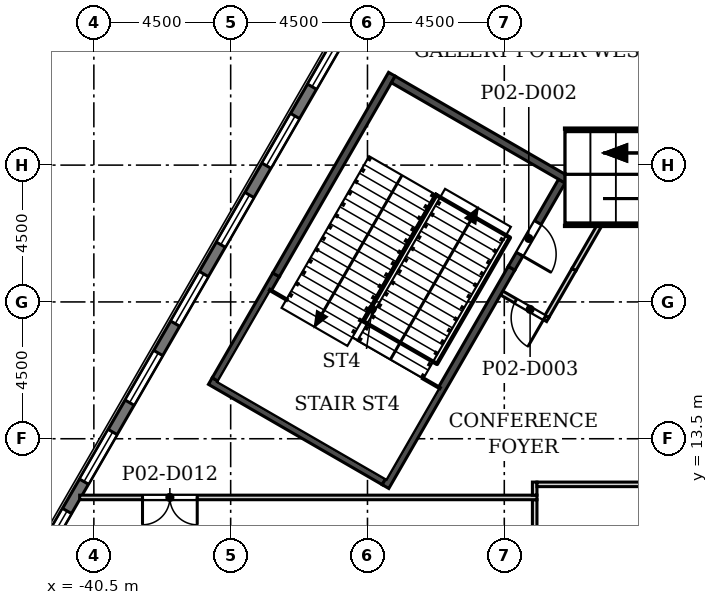
"""IFC4 building model, lengths in metres.
Left out: names, types, materials, properties, quantities, classifications, styles, units other than length and angle.
Written with IfcOpenShell. Run it as: python <this file> out.ifc"""

import sys

from ifc_helpers import new_model, si_unit, direction, frame, frame_2d, origin, place, context, subcontext, project, spatial, rectangle, extrude, element, fill, save


model = new_model("IFC4")
c1 = context("Model", 3, precision=1e-05, world=origin(), true_north=direction((0.0, 1.0)))
c2 = subcontext(c1, "Body", "Model", "MODEL_VIEW")
j1 = project(units=[si_unit("LENGTHUNIT", "METRE"), si_unit("PLANEANGLEUNIT", "RADIAN")], contexts=[c1])
p1 = place(None, origin())
s1 = spatial("IfcSite", under=j1, at=p1, CompositionType="ELEMENT")
p2 = place(p1, origin())
s2 = spatial("IfcBuilding", under=s1, at=p2, CompositionType="ELEMENT")
p3 = place(p2, frame((0.0, 0.0, 14.0)))
s3 = spatial("IfcBuildingStorey", under=s2, at=p3, CompositionType="ELEMENT", Elevation=14.0)
p4 = place(p3, frame((-4.853, 74.393, 0.0), z_axis=(0.0, 0.0, 1.0), x_axis=(-0.49999894854, -0.866026010844, 0.0)))
e1 = element("IfcWall", 1, at=p4, inside=s3, PredefinedType="SOLIDWALL", context=c2, shape_type="SweptSolid", body=[
    extrude(rectangle(XDim=76.0, YDim=0.34, at=frame_2d((38.0, 0.0))), origin(), (0.0, 0.0, 1.0), 5.7),
])
p5 = place(p4, frame((1.058, 0.0, 0.9)))
e2 = element("IfcOpeningElement", 2, at=p5, cuts=e1, PredefinedType="OPENING", context=c2, shape_type="SweptSolid", body=[
    extrude(rectangle(XDim=1.885, YDim=3.5, at=frame_2d((0.942, 1.75))), frame((0.0, 0.18, 0.0), z_axis=(0.0, -1.0, 0.0), x_axis=(1.0, 0.0, 0.0)), (0.0, 0.0, 1.0), 0.36),
])
p6 = place(p4, frame((4.058, 0.0, 0.9)))
e3 = element("IfcOpeningElement", 3, at=p6, cuts=e1, PredefinedType="OPENING", context=c2, shape_type="SweptSolid", body=[
    extrude(rectangle(XDim=1.885, YDim=3.5, at=frame_2d((0.942, 1.75))), frame((0.0, 0.18, 0.0), z_axis=(0.0, -1.0, 0.0), x_axis=(1.0, 0.0, 0.0)), (0.0, 0.0, 1.0), 0.36),
])
p7 = place(p4, frame((7.058, 0.0, 0.9)))
e4 = element("IfcOpeningElement", 4, at=p7, cuts=e1, PredefinedType="OPENING", context=c2, shape_type="SweptSolid", body=[
    extrude(rectangle(XDim=1.885, YDim=3.5, at=frame_2d((0.942, 1.75))), frame((0.0, 0.18, 0.0), z_axis=(0.0, -1.0, 0.0), x_axis=(1.0, 0.0, 0.0)), (0.0, 0.0, 1.0), 0.36),
])
p8 = place(p4, frame((10.058, 0.0, 0.9)))
e5 = element("IfcOpeningElement", 5, at=p8, cuts=e1, PredefinedType="OPENING", context=c2, shape_type="SweptSolid", body=[
    extrude(rectangle(XDim=1.885, YDim=3.5, at=frame_2d((0.942, 1.75))), frame((0.0, 0.18, 0.0), z_axis=(0.0, -1.0, 0.0), x_axis=(1.0, 0.0, 0.0)), (0.0, 0.0, 1.0), 0.36),
])
p9 = place(p4, frame((13.058, 0.0, 0.9)))
e6 = element("IfcOpeningElement", 6, at=p9, cuts=e1, PredefinedType="OPENING", context=c2, shape_type="SweptSolid", body=[
    extrude(rectangle(XDim=1.885, YDim=3.5, at=frame_2d((0.942, 1.75))), frame((0.0, 0.18, 0.0), z_axis=(0.0, -1.0, 0.0), x_axis=(1.0, 0.0, 0.0)), (0.0, 0.0, 1.0), 0.36),
])
p10 = place(p4, frame((16.058, 0.0, 0.9)))
e7 = element("IfcOpeningElement", 7, at=p10, cuts=e1, PredefinedType="OPENING", context=c2, shape_type="SweptSolid", body=[
    extrude(rectangle(XDim=1.885, YDim=3.5, at=frame_2d((0.942, 1.75))), frame((0.0, 0.18, 0.0), z_axis=(0.0, -1.0, 0.0), x_axis=(1.0, 0.0, 0.0)), (0.0, 0.0, 1.0), 0.36),
])
p11 = place(p4, frame((19.058, 0.0, 0.9)))
e8 = element("IfcOpeningElement", 8, at=p11, cuts=e1, PredefinedType="OPENING", context=c2, shape_type="SweptSolid", body=[
    extrude(rectangle(XDim=1.885, YDim=3.5, at=frame_2d((0.942, 1.75))), frame((0.0, 0.18, 0.0), z_axis=(0.0, -1.0, 0.0), x_axis=(1.0, 0.0, 0.0)), (0.0, 0.0, 1.0), 0.36),
])
p12 = place(p4, frame((22.058, 0.0, 0.9)))
e9 = element("IfcOpeningElement", 9, at=p12, cuts=e1, PredefinedType="OPENING", context=c2, shape_type="SweptSolid", body=[
    extrude(rectangle(XDim=1.885, YDim=3.5, at=frame_2d((0.942, 1.75))), frame((0.0, 0.18, 0.0), z_axis=(0.0, -1.0, 0.0), x_axis=(1.0, 0.0, 0.0)), (0.0, 0.0, 1.0), 0.36),
])
p13 = place(p4, frame((25.058, 0.0, 0.9)))
e10 = element("IfcOpeningElement", 10, at=p13, cuts=e1, PredefinedType="OPENING", context=c2, shape_type="SweptSolid", body=[
    extrude(rectangle(XDim=1.885, YDim=3.5, at=frame_2d((0.942, 1.75))), frame((0.0, 0.18, 0.0), z_axis=(0.0, -1.0, 0.0), x_axis=(1.0, 0.0, 0.0)), (0.0, 0.0, 1.0), 0.36),
])
p14 = place(p4, frame((28.058, 0.0, 0.9)))
e11 = element("IfcOpeningElement", 11, at=p14, cuts=e1, PredefinedType="OPENING", context=c2, shape_type="SweptSolid", body=[
    extrude(rectangle(XDim=1.885, YDim=3.5, at=frame_2d((0.942, 1.75))), frame((0.0, 0.18, 0.0), z_axis=(0.0, -1.0, 0.0), x_axis=(1.0, 0.0, 0.0)), (0.0, 0.0, 1.0), 0.36),
])
p15 = place(p4, frame((31.058, 0.0, 0.9)))
e12 = element("IfcOpeningElement", 12, at=p15, cuts=e1, PredefinedType="OPENING", context=c2, shape_type="SweptSolid", body=[
    extrude(rectangle(XDim=1.885, YDim=3.5, at=frame_2d((0.942, 1.75))), frame((0.0, 0.18, 0.0), z_axis=(0.0, -1.0, 0.0), x_axis=(1.0, 0.0, 0.0)), (0.0, 0.0, 1.0), 0.36),
])
p16 = place(p4, frame((34.058, 0.0, 0.9)))
e13 = element("IfcOpeningElement", 13, at=p16, cuts=e1, PredefinedType="OPENING", context=c2, shape_type="SweptSolid", body=[
    extrude(rectangle(XDim=1.885, YDim=3.5, at=frame_2d((0.942, 1.75))), frame((0.0, 0.18, 0.0), z_axis=(0.0, -1.0, 0.0), x_axis=(1.0, 0.0, 0.0)), (0.0, 0.0, 1.0), 0.36),
])
p17 = place(p4, frame((37.058, 0.0, 0.9)))
e14 = element("IfcOpeningElement", 14, at=p17, cuts=e1, PredefinedType="OPENING", context=c2, shape_type="SweptSolid", body=[
    extrude(rectangle(XDim=1.885, YDim=3.5, at=frame_2d((0.942, 1.75))), frame((0.0, 0.18, 0.0), z_axis=(0.0, -1.0, 0.0), x_axis=(1.0, 0.0, 0.0)), (0.0, 0.0, 1.0), 0.36),
])
p18 = place(p4, frame((40.058, 0.0, 0.9)))
e15 = element("IfcOpeningElement", 15, at=p18, cuts=e1, PredefinedType="OPENING", context=c2, shape_type="SweptSolid", body=[
    extrude(rectangle(XDim=1.885, YDim=3.5, at=frame_2d((0.942, 1.75))), frame((0.0, 0.18, 0.0), z_axis=(0.0, -1.0, 0.0), x_axis=(1.0, 0.0, 0.0)), (0.0, 0.0, 1.0), 0.36),
])
p19 = place(p4, frame((43.058, 0.0, 0.9)))
e16 = element("IfcOpeningElement", 16, at=p19, cuts=e1, PredefinedType="OPENING", context=c2, shape_type="SweptSolid", body=[
    extrude(rectangle(XDim=1.885, YDim=3.5, at=frame_2d((0.942, 1.75))), frame((0.0, 0.18, 0.0), z_axis=(0.0, -1.0, 0.0), x_axis=(1.0, 0.0, 0.0)), (0.0, 0.0, 1.0), 0.36),
])
p20 = place(p4, frame((46.058, 0.0, 0.9)))
e17 = element("IfcOpeningElement", 17, at=p20, cuts=e1, PredefinedType="OPENING", context=c2, shape_type="SweptSolid", body=[
    extrude(rectangle(XDim=1.885, YDim=3.5, at=frame_2d((0.942, 1.75))), frame((0.0, 0.18, 0.0), z_axis=(0.0, -1.0, 0.0), x_axis=(1.0, 0.0, 0.0)), (0.0, 0.0, 1.0), 0.36),
])
p21 = place(p4, frame((49.058, 0.0, 0.9)))
e18 = element("IfcOpeningElement", 18, at=p21, cuts=e1, PredefinedType="OPENING", context=c2, shape_type="SweptSolid", body=[
    extrude(rectangle(XDim=1.885, YDim=3.5, at=frame_2d((0.942, 1.75))), frame((0.0, 0.18, 0.0), z_axis=(0.0, -1.0, 0.0), x_axis=(1.0, 0.0, 0.0)), (0.0, 0.0, 1.0), 0.36),
])
p22 = place(p4, frame((52.058, 0.0, 0.9)))
e19 = element("IfcOpeningElement", 19, at=p22, cuts=e1, PredefinedType="OPENING", context=c2, shape_type="SweptSolid", body=[
    extrude(rectangle(XDim=1.885, YDim=3.5, at=frame_2d((0.942, 1.75))), frame((0.0, 0.18, 0.0), z_axis=(0.0, -1.0, 0.0), x_axis=(1.0, 0.0, 0.0)), (0.0, 0.0, 1.0), 0.36),
])
p23 = place(p4, frame((55.058, 0.0, 0.9)))
e20 = element("IfcOpeningElement", 20, at=p23, cuts=e1, PredefinedType="OPENING", context=c2, shape_type="SweptSolid", body=[
    extrude(rectangle(XDim=1.885, YDim=3.5, at=frame_2d((0.942, 1.75))), frame((0.0, 0.18, 0.0), z_axis=(0.0, -1.0, 0.0), x_axis=(1.0, 0.0, 0.0)), (0.0, 0.0, 1.0), 0.36),
])
p24 = place(p4, frame((58.058, 0.0, 0.9)))
e21 = element("IfcOpeningElement", 21, at=p24, cuts=e1, PredefinedType="OPENING", context=c2, shape_type="SweptSolid", body=[
    extrude(rectangle(XDim=1.885, YDim=3.5, at=frame_2d((0.942, 1.75))), frame((0.0, 0.18, 0.0), z_axis=(0.0, -1.0, 0.0), x_axis=(1.0, 0.0, 0.0)), (0.0, 0.0, 1.0), 0.36),
])
p25 = place(p4, frame((61.058, 0.0, 0.9)))
e22 = element("IfcOpeningElement", 22, at=p25, cuts=e1, PredefinedType="OPENING", context=c2, shape_type="SweptSolid", body=[
    extrude(rectangle(XDim=1.885, YDim=3.5, at=frame_2d((0.942, 1.75))), frame((0.0, 0.18, 0.0), z_axis=(0.0, -1.0, 0.0), x_axis=(1.0, 0.0, 0.0)), (0.0, 0.0, 1.0), 0.36),
])
p26 = place(p4, frame((64.058, 0.0, 0.9)))
e23 = element("IfcOpeningElement", 23, at=p26, cuts=e1, PredefinedType="OPENING", context=c2, shape_type="SweptSolid", body=[
    extrude(rectangle(XDim=1.885, YDim=3.5, at=frame_2d((0.942, 1.75))), frame((0.0, 0.18, 0.0), z_axis=(0.0, -1.0, 0.0), x_axis=(1.0, 0.0, 0.0)), (0.0, 0.0, 1.0), 0.36),
])
p27 = place(p4, frame((67.058, 0.0, 0.9)))
e24 = element("IfcOpeningElement", 24, at=p27, cuts=e1, PredefinedType="OPENING", context=c2, shape_type="SweptSolid", body=[
    extrude(rectangle(XDim=1.885, YDim=3.5, at=frame_2d((0.942, 1.75))), frame((0.0, 0.18, 0.0), z_axis=(0.0, -1.0, 0.0), x_axis=(1.0, 0.0, 0.0)), (0.0, 0.0, 1.0), 0.36),
])
p28 = place(p4, frame((70.058, 0.0, 0.9)))
e25 = element("IfcOpeningElement", 25, at=p28, cuts=e1, PredefinedType="OPENING", context=c2, shape_type="SweptSolid", body=[
    extrude(rectangle(XDim=1.885, YDim=3.5, at=frame_2d((0.942, 1.75))), frame((0.0, 0.18, 0.0), z_axis=(0.0, -1.0, 0.0), x_axis=(1.0, 0.0, 0.0)), (0.0, 0.0, 1.0), 0.36),
])
p29 = place(p4, frame((73.058, 0.0, 0.9)))
e26 = element("IfcOpeningElement", 26, at=p29, cuts=e1, PredefinedType="OPENING", context=c2, shape_type="SweptSolid", body=[
    extrude(rectangle(XDim=1.885, YDim=3.5, at=frame_2d((0.942, 1.75))), frame((0.0, 0.18, 0.0), z_axis=(0.0, -1.0, 0.0), x_axis=(1.0, 0.0, 0.0)), (0.0, 0.0, 1.0), 0.36),
])
p30 = place(p3, frame((-26.0, 11.495, 0.0), z_axis=(0.0, 0.0, 1.0), x_axis=(0.0, -1.0, 0.0)))
e27 = element("IfcWall", 27, at=p30, inside=s3, PredefinedType="PARTITIONING", context=c2, shape_type="SweptSolid", body=[
    extrude(rectangle(XDim=1.42, YDim=0.15, at=frame_2d((0.71, 0.0))), origin(), (0.0, 0.0, 1.0), 5.7),
])
p31 = place(p3, frame((-40.968, 11.57, 0.0), z_axis=(0.0, 0.0, 1.0), x_axis=(1.0, 0.0, 0.0)))
e28 = element("IfcWall", 28, at=p31, inside=s3, PredefinedType="PARTITIONING", context=c2, shape_type="SweptSolid", body=[
    extrude(rectangle(XDim=15.043, YDim=0.15, at=frame_2d((7.521, 0.0))), origin(), (0.0, 0.0, 1.0), 5.7),
])
p32 = place(p31, frame((2.068, 0.0, 0.0)))
e29 = element("IfcOpeningElement", 29, at=p32, cuts=e28, PredefinedType="OPENING", context=c2, shape_type="SweptSolid", body=[
    extrude(rectangle(XDim=1.8, YDim=2.1, at=frame_2d((0.9, 1.05))), frame((0.0, 0.085, 0.0), z_axis=(0.0, -1.0, 0.0), x_axis=(1.0, 0.0, 0.0)), (0.0, 0.0, 1.0), 0.17),
])
p33 = place(p3, frame((-26.0, 11.645, 0.0), z_axis=(0.0, 0.0, 1.0), x_axis=(0.0, 1.0, 0.0)))
e30 = element("IfcWall", 30, at=p33, inside=s3, PredefinedType="PARTITIONING", context=c2, shape_type="SweptSolid", body=[
    extrude(rectangle(XDim=0.43, YDim=0.15, at=frame_2d((0.215, 0.0))), origin(), (0.0, 0.0, 1.0), 5.7),
])
p34 = place(p3, frame((-25.925, 12.0, 0.0), z_axis=(0.0, 0.0, 1.0), x_axis=(1.0, 0.0, 0.0)))
e31 = element("IfcWall", 31, at=p34, inside=s3, PredefinedType="PARTITIONING", context=c2, shape_type="SweptSolid", body=[
    extrude(rectangle(XDim=12.512, YDim=0.15, at=frame_2d((6.256, 0.0))), origin(), (0.0, 0.0, 1.0), 5.7),
])
p35 = place(p34, frame((5.025, 0.0, 0.0)))
e32 = element("IfcOpeningElement", 32, at=p35, cuts=e31, PredefinedType="OPENING", context=c2, shape_type="SweptSolid", body=[
    extrude(rectangle(XDim=1.8, YDim=2.1, at=frame_2d((0.9, 1.05))), frame((0.0, 0.085, 0.0), z_axis=(0.0, -1.0, 0.0), x_axis=(1.0, 0.0, 0.0)), (0.0, 0.0, 1.0), 0.17),
])
p36 = place(p3, frame((-30.953, 12.097, 0.0), z_axis=(0.0, 0.0, 1.0), x_axis=(-0.866040211805, 0.499974350878, 0.0)))
e33 = element("IfcWall", 33, at=p36, inside=s3, PredefinedType="SOLIDWALL", context=c2, shape_type="SweptSolid", body=[
    extrude(rectangle(XDim=6.6, YDim=0.25, at=frame_2d((3.3, 0.0))), origin(), (0.0, 0.0, 1.0), 5.7),
])
p37 = place(p3, frame((-36.498, 15.443, 0.0), z_axis=(0.0, 0.0, 1.0), x_axis=(0.499989551455, 0.866031436171, 0.0)))
e34 = element("IfcWall", 34, at=p37, inside=s3, PredefinedType="SOLIDWALL", context=c2, shape_type="SweptSolid", body=[
    extrude(rectangle(XDim=3.982, YDim=0.25, at=frame_2d((1.991, 0.0))), origin(), (0.0, 0.0, 1.0), 5.7),
])
p38 = place(p3, frame((-25.571, 17.419, 0.0), z_axis=(0.0, 0.0, 1.0), x_axis=(-0.866046247233, 0.49996389635, 0.0)))
e35 = element("IfcWall", 35, at=p38, inside=s3, PredefinedType="PARTITIONING", context=c2, shape_type="SweptSolid", body=[
    extrude(rectangle(XDim=1.751, YDim=0.15, at=frame_2d((0.875, 0.0))), origin(), (0.0, 0.0, 1.0), 5.7),
])
p39 = place(p38, frame((0.12, 0.0, 0.0)))
e36 = element("IfcOpeningElement", 36, at=p39, cuts=e35, PredefinedType="OPENING", context=c2, shape_type="SweptSolid", body=[
    extrude(rectangle(XDim=1.1, YDim=2.1, at=frame_2d((0.55, 1.05))), frame((0.0, 0.085, 0.0), z_axis=(0.0, -1.0, 0.0), x_axis=(1.0, 0.0, 0.0)), (0.0, 0.0, 1.0), 0.17),
])
p40 = place(p3, frame((-34.507, 18.892, 0.0), z_axis=(0.0, 0.0, 1.0), x_axis=(0.499958264338, 0.866049498539, 0.0)))
e37 = element("IfcWall", 37, at=p40, inside=s3, PredefinedType="SOLIDWALL", context=c2, shape_type="SweptSolid", body=[
    extrude(rectangle(XDim=7.618, YDim=0.25, at=frame_2d((3.809, 0.0))), origin(), (0.0, 0.0, 1.0), 5.7),
])
p41 = place(p3, frame((-24.707, 19.065, 0.0), z_axis=(0.0, 0.0, 1.0), x_axis=(-0.500058459303, -0.865991649659, 0.0)))
e38 = element("IfcWall", 38, at=p41, inside=s3, PredefinedType="PARTITIONING", context=c2, shape_type="SweptSolid", body=[
    extrude(rectangle(XDim=1.782, YDim=0.15, at=frame_2d((0.891, 0.0))), origin(), (0.0, 0.0, 1.0), 5.7),
])
p42 = place(p3, frame((-26.761, 19.108, 0.0), z_axis=(0.0, 0.0, 1.0), x_axis=(-0.499979843709, -0.866037040711, 0.0)))
e39 = element("IfcWall", 39, at=p42, inside=s3, PredefinedType="SOLIDWALL", context=c2, shape_type="SweptSolid", body=[
    extrude(rectangle(XDim=8.293, YDim=0.25, at=frame_2d((4.146, 0.0))), origin(), (0.0, 0.0, 1.0), 5.7),
])
p43 = place(p3, frame((-23.841, 20.565, 0.0), z_axis=(0.0, 0.0, 1.0), x_axis=(-0.500019299785, -0.866014260761, 0.0)))
e40 = element("IfcWall", 40, at=p43, inside=s3, PredefinedType="PARTITIONING", context=c2, shape_type="SweptSolid", body=[
    extrude(rectangle(XDim=1.732, YDim=0.15, at=frame_2d((0.866, 0.0))), origin(), (0.0, 0.0, 1.0), 5.7),
])
p44 = place(p3, frame((-25.107, 21.972, 0.0), z_axis=(0.0, 0.0, 1.0), x_axis=(-0.500005757777, -0.866022079505, 0.0)))
e41 = element("IfcWall", 41, at=p44, inside=s3, PredefinedType="SOLIDWALL", context=c2, shape_type="SweptSolid", body=[
    extrude(rectangle(XDim=3.307, YDim=0.25, at=frame_2d((1.654, 0.0))), origin(), (0.0, 0.0, 1.0), 5.7),
])
p45 = place(p44, frame((1.575, 0.0, 0.0)))
e42 = element("IfcOpeningElement", 42, at=p45, cuts=e41, PredefinedType="OPENING", context=c2, shape_type="SweptSolid", body=[
    extrude(rectangle(XDim=1.2, YDim=2.1, at=frame_2d((0.6, 1.05))), frame((0.0, 0.135, 0.0), z_axis=(0.0, -1.0, 0.0), x_axis=(1.0, 0.0, 0.0)), (0.0, 0.0, 1.0), 0.27),
])
p46 = place(p3, frame((-30.652, 25.318, 0.0), z_axis=(0.0, 0.0, 1.0), x_axis=(0.866040211805, -0.499974350878, 0.0)))
e43 = element("IfcWall", 43, at=p46, inside=s3, PredefinedType="SOLIDWALL", context=c2, shape_type="SweptSolid", body=[
    extrude(rectangle(XDim=6.6, YDim=0.25, at=frame_2d((3.3, 0.0))), origin(), (0.0, 0.0, 1.0), 5.7),
])
p47 = place(p23, origin())
e44 = element("IfcWindow", 44, at=p47, inside=s3, PartitioningType="SINGLE_PANEL", PredefinedType="WINDOW", context=c2, shape_type="SweptSolid", body=[
    extrude(rectangle(XDim=1.885, YDim=3.5, at=frame_2d((0.942, 1.75))), frame((0.0, 0.11, 0.0), z_axis=(0.0, -1.0, 0.0), x_axis=(1.0, 0.0, 0.0)), (0.0, 0.0, 1.0), 0.06),
])
fill(e20, e44)
p48 = place(p24, origin())
e45 = element("IfcWindow", 45, at=p48, inside=s3, PartitioningType="SINGLE_PANEL", PredefinedType="WINDOW", context=c2, shape_type="SweptSolid", body=[
    extrude(rectangle(XDim=1.885, YDim=3.5, at=frame_2d((0.942, 1.75))), frame((0.0, 0.11, 0.0), z_axis=(0.0, -1.0, 0.0), x_axis=(1.0, 0.0, 0.0)), (0.0, 0.0, 1.0), 0.06),
])
fill(e21, e45)
p49 = place(p25, origin())
e46 = element("IfcWindow", 46, at=p49, inside=s3, PartitioningType="SINGLE_PANEL", PredefinedType="WINDOW", context=c2, shape_type="SweptSolid", body=[
    extrude(rectangle(XDim=1.885, YDim=3.5, at=frame_2d((0.942, 1.75))), frame((0.0, 0.11, 0.0), z_axis=(0.0, -1.0, 0.0), x_axis=(1.0, 0.0, 0.0)), (0.0, 0.0, 1.0), 0.06),
])
fill(e22, e46)
p50 = place(p26, origin())
e47 = element("IfcWindow", 47, at=p50, inside=s3, PartitioningType="SINGLE_PANEL", PredefinedType="WINDOW", context=c2, shape_type="SweptSolid", body=[
    extrude(rectangle(XDim=1.885, YDim=3.5, at=frame_2d((0.942, 1.75))), frame((0.0, 0.11, 0.0), z_axis=(0.0, -1.0, 0.0), x_axis=(1.0, 0.0, 0.0)), (0.0, 0.0, 1.0), 0.06),
])
fill(e23, e47)
p51 = place(p27, origin())
e48 = element("IfcWindow", 48, at=p51, inside=s3, PartitioningType="SINGLE_PANEL", PredefinedType="WINDOW", context=c2, shape_type="SweptSolid", body=[
    extrude(rectangle(XDim=1.885, YDim=3.5, at=frame_2d((0.942, 1.75))), frame((0.0, 0.11, 0.0), z_axis=(0.0, -1.0, 0.0), x_axis=(1.0, 0.0, 0.0)), (0.0, 0.0, 1.0), 0.06),
])
fill(e24, e48)
p52 = place(p28, origin())
e49 = element("IfcWindow", 49, at=p52, inside=s3, PartitioningType="SINGLE_PANEL", PredefinedType="WINDOW", context=c2, shape_type="SweptSolid", body=[
    extrude(rectangle(XDim=1.885, YDim=3.5, at=frame_2d((0.942, 1.75))), frame((0.0, 0.11, 0.0), z_axis=(0.0, -1.0, 0.0), x_axis=(1.0, 0.0, 0.0)), (0.0, 0.0, 1.0), 0.06),
])
fill(e25, e49)
p53 = place(p29, origin())
e50 = element("IfcWindow", 50, at=p53, inside=s3, PartitioningType="SINGLE_PANEL", PredefinedType="WINDOW", context=c2, shape_type="SweptSolid", body=[
    extrude(rectangle(XDim=1.885, YDim=3.5, at=frame_2d((0.942, 1.75))), frame((0.0, 0.11, 0.0), z_axis=(0.0, -1.0, 0.0), x_axis=(1.0, 0.0, 0.0)), (0.0, 0.0, 1.0), 0.06),
])
fill(e26, e50)
p54 = place(p45, origin())
e51 = element("IfcDoor", 51, at=p54, inside=s3, OperationType="SINGLE_SWING_RIGHT", PredefinedType="DOOR", context=c2, shape_type="SweptSolid", body=[
    extrude(rectangle(XDim=1.2, YDim=2.1, at=frame_2d((0.6, 1.05))), frame((0.0, 0.025, 0.0), z_axis=(0.0, -1.0, 0.0), x_axis=(1.0, 0.0, 0.0)), (0.0, 0.0, 1.0), 0.05),
])
fill(e42, e51)
p55 = place(p39, origin())
e52 = element("IfcDoor", 52, at=p55, inside=s3, OperationType="SINGLE_SWING_LEFT", PredefinedType="DOOR", context=c2, shape_type="SweptSolid", body=[
    extrude(rectangle(XDim=1.1, YDim=2.1, at=frame_2d((0.55, 1.05))), frame((0.0, 0.025, 0.0), z_axis=(0.0, -1.0, 0.0), x_axis=(1.0, 0.0, 0.0)), (0.0, 0.0, 1.0), 0.05),
])
fill(e36, e52)
p56 = place(p32, frame((1.8, 0.0, 0.0), z_axis=(0.0, 0.0, 1.0), x_axis=(-1.0, 0.0, 0.0)))
e53 = element("IfcDoor", 53, at=p56, inside=s3, OperationType="DOUBLE_DOOR_SINGLE_SWING", PredefinedType="DOOR", context=c2, shape_type="SweptSolid", body=[
    extrude(rectangle(XDim=1.8, YDim=2.1, at=frame_2d((0.9, 1.05))), frame((0.0, 0.025, 0.0), z_axis=(0.0, -1.0, 0.0), x_axis=(1.0, 0.0, 0.0)), (0.0, 0.0, 1.0), 0.05),
])
fill(e29, e53)
save(model, sys.argv[1])
